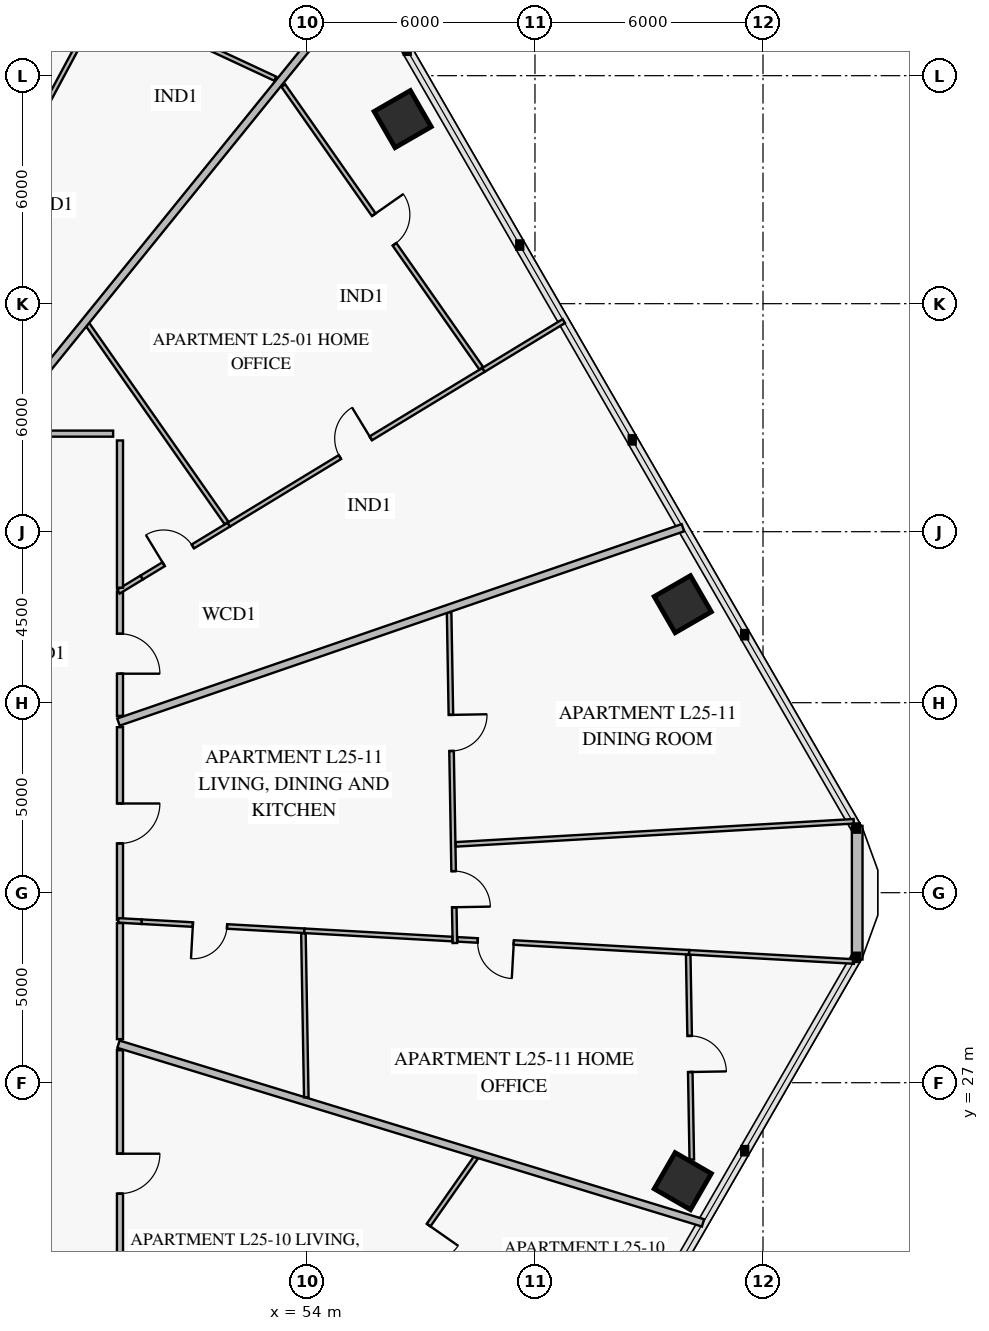
"""IFC4 building model, lengths in metres.
Left out: names, types, materials, properties, quantities, classifications, styles, units other than length and angle.
Written with IfcOpenShell. Run it as: python <this file> out.ifc"""

import sys

from ifc_helpers import new_model, si_unit, direction, frame, frame_2d, origin, origin_2d, place, context, subcontext, project, spatial, rectangle, extrude, element, fill, save


model = new_model("IFC4")
c1 = context("Model", 3, precision=1e-05, world=origin(), true_north=direction((0.0, 1.0)))
c2 = subcontext(c1, "Body", "Model", "MODEL_VIEW")
j1 = project(units=[si_unit("LENGTHUNIT", "METRE"), si_unit("PLANEANGLEUNIT", "RADIAN")], contexts=[c1])
p1 = place(None, origin())
s1 = spatial("IfcSite", under=j1, at=p1, CompositionType="ELEMENT")
p2 = place(p1, origin())
s2 = spatial("IfcBuilding", under=s1, at=p2, CompositionType="ELEMENT")
p3 = place(p2, frame((0.0, 0.0, 103.8)))
s3 = spatial("IfcBuildingStorey", under=s2, at=p3, CompositionType="ELEMENT", Elevation=103.8)
for number, where, z_axis, x_axis in (
    (1, (63.889, 39.592, 0.0), (0.0, 0.0, 1.0), (-0.5, 0.866, 0.0)),
    (2, (56.519, 52.357, 0.0), (0.0, 0.0, 1.0), (-0.5, 0.866, 0.0)),
    (3, (63.889, 24.408, 0.0), (0.0, 0.0, 1.0), (0.5, 0.866, 0.0)),
):
    element("IfcColumn", number, at=place(p3, frame(where, z_axis=z_axis, x_axis=x_axis)), inside=s3, PredefinedType="COLUMN", context=c2, shape_type="SweptSolid", body=[
        extrude(rectangle(XDim=1.1, YDim=1.1, at=origin_2d()), origin(), (0.0, 0.0, 1.0), 3.55),
    ])
p4 = place(p3, frame((68.479, 33.758, 0.0), z_axis=(0.0, 0.0, 1.0), x_axis=(0.0, -1.0, 0.0)))
e4 = element("IfcWall", 4, at=p4, inside=s3, PredefinedType="SOLIDWALL", context=c2, shape_type="SweptSolid", body=[
    extrude(rectangle(XDim=3.515, YDim=0.28, at=frame_2d((1.758, 0.0))), origin(), (0.0, 0.0, 1.0), 3.55),
])
p5 = place(p3, frame((49.65, 40.293, 0.0), z_axis=(0.0, 0.0, 1.0), x_axis=(0.854654905255, 0.519196487781, 0.0)))
e5 = element("IfcWall", 5, at=p5, inside=s3, PredefinedType="PARTITIONING", context=c2, shape_type="SweptSolid", body=[
    extrude(rectangle(XDim=2.684, YDim=0.12, at=frame_2d((1.342, 0.0))), origin(), (0.0, 0.0, 1.0), 3.55),
])
p6 = place(p5, frame((0.677, 0.0, 0.0)))
e6 = element("IfcOpeningElement", 6, at=p6, cuts=e5, PredefinedType="OPENING", context=c2, shape_type="SweptSolid", body=[
    extrude(rectangle(XDim=0.9, YDim=2.1, at=frame_2d((0.45, 1.05))), frame((0.0, 0.072, 0.0), z_axis=(0.0, -1.0, 0.0), x_axis=(1.0, 0.0, 0.0)), (0.0, 0.0, 1.0), 0.144),
])
p7 = place(p3, frame((51.944, 41.686, 0.0), z_axis=(0.0, 0.0, 1.0), x_axis=(0.854642479396, 0.519216941569, 0.0)))
e7 = element("IfcWall", 7, at=p7, inside=s3, PredefinedType="PARTITIONING", context=c2, shape_type="SweptSolid", body=[
    extrude(rectangle(XDim=7.843, YDim=0.12, at=frame_2d((3.921, 0.0))), origin(), (0.0, 0.0, 1.0), 3.1),
])
p8 = place(p7, frame((3.421, 0.0, 0.0)))
e8 = element("IfcOpeningElement", 8, at=p8, cuts=e7, PredefinedType="OPENING", context=c2, shape_type="SweptSolid", body=[
    extrude(rectangle(XDim=0.95, YDim=2.1, at=frame_2d((0.475, 1.05))), frame((0.0, 0.072, 0.0), z_axis=(0.0, -1.0, 0.0), x_axis=(1.0, 0.0, 0.0)), (0.0, 0.0, 1.0), 0.144),
])
p9 = place(p3, frame((58.586, 45.801, 0.0), z_axis=(0.0, 0.0, 1.0), x_axis=(-0.573574227098, 0.81915359122, 0.0)))
e9 = element("IfcWall", 9, at=p9, inside=s3, PredefinedType="PARTITIONING", context=c2, shape_type="SweptSolid", body=[
    extrude(rectangle(XDim=9.08, YDim=0.12, at=frame_2d((4.54, 0.0))), origin(), (0.0, 0.0, 1.0), 2.85),
])
p10 = place(p9, frame((3.98, 0.0, 0.0)))
e10 = element("IfcOpeningElement", 10, at=p10, cuts=e9, PredefinedType="OPENING", context=c2, shape_type="SweptSolid", body=[
    extrude(rectangle(XDim=0.95, YDim=2.1, at=frame_2d((0.475, 1.05))), frame((0.0, 0.072, 0.0), z_axis=(0.0, -1.0, 0.0), x_axis=(1.0, 0.0, 0.0)), (0.0, 0.0, 1.0), 0.144),
])
p11 = place(p3, frame((49.08, 36.653, 0.0), z_axis=(0.0, 0.0, 1.0), x_axis=(0.0, 1.0, 0.0)))
e11 = element("IfcWall", 11, at=p11, inside=s3, PredefinedType="PARTITIONING", context=c2, shape_type="SweptSolid", body=[
    extrude(rectangle(XDim=3.27, YDim=0.16, at=frame_2d((1.635, 0.0))), origin(), (0.0, 0.0, 1.0), 3.55),
])
p12 = place(p11, frame((1.11, 0.0, 0.0)))
e12 = element("IfcOpeningElement", 12, at=p12, cuts=e11, PredefinedType="OPENING", context=c2, shape_type="SweptSolid", body=[
    extrude(rectangle(XDim=1.05, YDim=2.15, at=frame_2d((0.525, 1.075))), frame((0.0, 0.092, 0.0), z_axis=(0.0, -1.0, 0.0), x_axis=(1.0, 0.0, 0.0)), (0.0, 0.0, 1.0), 0.184),
])
p13 = place(p3, frame((53.166, 53.42, 0.0), z_axis=(0.0, 0.0, 1.0), x_axis=(-0.906301834907, 0.422631025889, 0.0)))
e13 = element("IfcWall", 13, at=p13, inside=s3, PredefinedType="PARTITIONING", context=c2, shape_type="SweptSolid", body=[
    extrude(rectangle(XDim=5.096, YDim=0.12, at=frame_2d((2.548, 0.0))), origin(), (0.0, 0.0, 1.0), 3.55),
])
p14 = place(p13, frame((2.073, 0.0, 0.0)))
e14 = element("IfcOpeningElement", 14, at=p14, cuts=e13, PredefinedType="OPENING", context=c2, shape_type="SweptSolid", body=[
    extrude(rectangle(XDim=0.95, YDim=2.1, at=frame_2d((0.475, 1.05))), frame((0.0, 0.072, 0.0), z_axis=(0.0, -1.0, 0.0), x_axis=(1.0, 0.0, 0.0)), (0.0, 0.0, 1.0), 0.144),
])
p15 = place(p3, frame((44.038, 46.965, 0.0), z_axis=(0.0, 0.0, 1.0), x_axis=(0.473145171057, 0.880984476086, 0.0)))
e15 = element("IfcWall", 15, at=p15, inside=s3, PredefinedType="PARTITIONING", context=c2, shape_type="SweptSolid", body=[
    extrude(rectangle(XDim=9.656, YDim=0.12, at=frame_2d((4.828, 0.0))), origin(), (0.0, 0.0, 1.0), 3.1),
])
p16 = place(p15, frame((5.014, 0.0, 0.0)))
e16 = element("IfcOpeningElement", 16, at=p16, cuts=e15, PredefinedType="OPENING", context=c2, shape_type="SweptSolid", body=[
    extrude(rectangle(XDim=0.95, YDim=2.1, at=frame_2d((0.475, 1.05))), frame((0.0, 0.072, 0.0), z_axis=(0.0, -1.0, 0.0), x_axis=(1.0, 0.0, 0.0)), (0.0, 0.0, 1.0), 0.144),
])
p17 = place(p3, frame((53.335, 17.732, 0.0), z_axis=(0.0, 0.0, 1.0), x_axis=(0.573576398243, 0.819152070972, 0.0)))
e17 = element("IfcWall", 17, at=p17, inside=s3, PredefinedType="PARTITIONING", context=c2, shape_type="SweptSolid", body=[
    extrude(rectangle(XDim=8.907, YDim=0.12, at=frame_2d((4.453, 0.0))), origin(), (0.0, 0.0, 1.0), 3.55),
])
p18 = place(p17, frame((1.576, 0.0, 0.0)))
e18 = element("IfcOpeningElement", 18, at=p18, cuts=e17, PredefinedType="OPENING", context=c2, shape_type="SweptSolid", body=[
    extrude(rectangle(XDim=0.95, YDim=2.1, at=frame_2d((0.475, 1.05))), frame((0.0, 0.072, 0.0), z_axis=(0.0, -1.0, 0.0), x_axis=(1.0, 0.0, 0.0)), (0.0, 0.0, 1.0), 0.144),
])
p19 = place(p17, frame((5.789, 0.0, 0.0)))
e19 = element("IfcOpeningElement", 19, at=p19, cuts=e17, PredefinedType="OPENING", context=c2, shape_type="SweptSolid", body=[
    extrude(rectangle(XDim=0.95, YDim=2.1, at=frame_2d((0.475, 1.05))), frame((0.0, 0.072, 0.0), z_axis=(0.0, -1.0, 0.0), x_axis=(1.0, 0.0, 0.0)), (0.0, 0.0, 1.0), 0.144),
])
p20 = place(p3, frame((49.08, 21.358, 0.0), z_axis=(0.0, 0.0, 1.0), x_axis=(0.0, 1.0, 0.0)))
e20 = element("IfcWall", 20, at=p20, inside=s3, PredefinedType="PARTITIONING", context=c2, shape_type="SweptSolid", body=[
    extrude(rectangle(XDim=6.497, YDim=0.16, at=frame_2d((3.249, 0.0))), origin(), (0.0, 0.0, 1.0), 3.55),
])
p21 = place(p20, frame((2.723, 0.0, 0.0)))
e21 = element("IfcOpeningElement", 21, at=p21, cuts=e20, PredefinedType="OPENING", context=c2, shape_type="SweptSolid", body=[
    extrude(rectangle(XDim=1.05, YDim=2.15, at=frame_2d((0.525, 1.075))), frame((0.0, 0.092, 0.0), z_axis=(0.0, -1.0, 0.0), x_axis=(1.0, 0.0, 0.0)), (0.0, 0.0, 1.0), 0.184),
])
p22 = place(p3, frame((57.893, 30.676, 0.0), z_axis=(0.0, 0.0, 1.0), x_axis=(-0.017472298046, 0.999847347749, 0.0)))
e22 = element("IfcWall", 22, at=p22, inside=s3, PredefinedType="PARTITIONING", context=c2, shape_type="SweptSolid", body=[
    extrude(rectangle(XDim=8.705, YDim=0.12, at=frame_2d((4.353, 0.0))), origin(), (0.0, 0.0, 1.0), 2.85),
])
p23 = place(p22, frame((0.941, 0.0, 0.0)))
e23 = element("IfcOpeningElement", 23, at=p23, cuts=e22, PredefinedType="OPENING", context=c2, shape_type="SweptSolid", body=[
    extrude(rectangle(XDim=0.95, YDim=2.1, at=frame_2d((0.475, 1.05))), frame((0.0, 0.072, 0.0), z_axis=(0.0, -1.0, 0.0), x_axis=(1.0, 0.0, 0.0)), (0.0, 0.0, 1.0), 0.144),
])
p24 = place(p22, frame((5.054, 0.0, 0.0)))
e24 = element("IfcOpeningElement", 24, at=p24, cuts=e22, PredefinedType="OPENING", context=c2, shape_type="SweptSolid", body=[
    extrude(rectangle(XDim=0.95, YDim=2.1, at=frame_2d((0.475, 1.05))), frame((0.0, 0.072, 0.0), z_axis=(0.0, -1.0, 0.0), x_axis=(1.0, 0.0, 0.0)), (0.0, 0.0, 1.0), 0.144),
])
p25 = place(p3, frame((49.65, 31.237, 0.0), z_axis=(0.0, 0.0, 1.0), x_axis=(0.998441902316, -0.055801144241, 0.0)))
e25 = element("IfcWall", 25, at=p25, inside=s3, PredefinedType="PARTITIONING", context=c2, shape_type="SweptSolid", body=[
    extrude(rectangle(XDim=4.288, YDim=0.12, at=frame_2d((2.144, 0.0))), origin(), (0.0, 0.0, 1.0), 3.55),
])
p26 = place(p25, frame((1.351, 0.0, 0.0)))
e26 = element("IfcOpeningElement", 26, at=p26, cuts=e25, PredefinedType="OPENING", context=c2, shape_type="SweptSolid", body=[
    extrude(rectangle(XDim=0.9, YDim=2.1, at=frame_2d((0.45, 1.05))), frame((0.0, 0.072, 0.0), z_axis=(0.0, -1.0, 0.0), x_axis=(1.0, 0.0, 0.0)), (0.0, 0.0, 1.0), 0.144),
])
p27 = place(p3, frame((53.931, 30.998, 0.0), z_axis=(0.0, 0.0, 1.0), x_axis=(0.998438110944, -0.055868941407, 0.0)))
e27 = element("IfcWall", 27, at=p27, inside=s3, PredefinedType="PARTITIONING", context=c2, shape_type="SweptSolid", body=[
    extrude(rectangle(XDim=3.898, YDim=0.12, at=frame_2d((1.949, 0.0))), origin(), (0.0, 0.0, 1.0), 3.1),
])
p28 = place(p3, frame((57.959, 30.772, 0.0), z_axis=(0.0, 0.0, 1.0), x_axis=(0.998441350972, -0.055811008487, 0.0)))
e28 = element("IfcWall", 28, at=p28, inside=s3, PredefinedType="PARTITIONING", context=c2, shape_type="SweptSolid", body=[
    extrude(rectangle(XDim=6.107, YDim=0.12, at=frame_2d((3.053, 0.0))), origin(), (0.0, 0.0, 1.0), 2.8),
])
p29 = place(p28, frame((0.536, 0.0, 0.0)))
e29 = element("IfcOpeningElement", 29, at=p29, cuts=e28, PredefinedType="OPENING", context=c2, shape_type="SweptSolid", body=[
    extrude(rectangle(XDim=0.95, YDim=2.1, at=frame_2d((0.475, 1.05))), frame((0.0, 0.072, 0.0), z_axis=(0.0, -1.0, 0.0), x_axis=(1.0, 0.0, 0.0)), (0.0, 0.0, 1.0), 0.144),
])
p30 = place(p3, frame((64.126, 24.979, 0.0), z_axis=(0.0, 0.0, 1.0), x_axis=(-0.017448954527, 0.999847755404, 0.0)))
e30 = element("IfcWall", 30, at=p30, inside=s3, PredefinedType="PARTITIONING", context=c2, shape_type="SweptSolid", body=[
    extrude(rectangle(XDim=5.387, YDim=0.12, at=frame_2d((2.693, 0.0))), origin(), (0.0, 0.0, 1.0), 2.8),
])
p31 = place(p30, frame((2.303, 0.0, 0.0)))
e31 = element("IfcOpeningElement", 31, at=p31, cuts=e30, PredefinedType="OPENING", context=c2, shape_type="SweptSolid", body=[
    extrude(rectangle(XDim=0.95, YDim=2.1, at=frame_2d((0.475, 1.05))), frame((0.0, 0.072, 0.0), z_axis=(0.0, -1.0, 0.0), x_axis=(1.0, 0.0, 0.0)), (0.0, 0.0, 1.0), 0.144),
])
p32 = place(p3, frame((49.08, 31.289, 0.0), z_axis=(0.0, 0.0, 1.0), x_axis=(0.0, 1.0, 0.0)))
e32 = element("IfcWall", 32, at=p32, inside=s3, PredefinedType="PARTITIONING", context=c2, shape_type="SweptSolid", body=[
    extrude(rectangle(XDim=5.067, YDim=0.16, at=frame_2d((2.533, 0.0))), origin(), (0.0, 0.0, 1.0), 2.85),
])
p33 = place(p32, frame((2.008, 0.0, 0.0)))
e33 = element("IfcOpeningElement", 33, at=p33, cuts=e32, PredefinedType="OPENING", context=c2, shape_type="SweptSolid", body=[
    extrude(rectangle(XDim=1.05, YDim=2.15, at=frame_2d((0.525, 1.075))), frame((0.0, 0.092, 0.0), z_axis=(0.0, -1.0, 0.0), x_axis=(1.0, 0.0, 0.0)), (0.0, 0.0, 1.0), 0.184),
])
p34 = place(p3, frame((49.04, 36.49, 0.0), z_axis=(0.0, 0.0, 1.0), x_axis=(0.945516411569, 0.325574439191, 0.0)))
e34 = element("IfcWall", 34, at=p34, inside=s3, PredefinedType="PARTITIONING", context=c2, shape_type="SweptSolid", body=[
    extrude(rectangle(XDim=15.709, YDim=0.2, at=frame_2d((7.854, 0.0))), origin(), (0.0, 0.0, 1.0), 2.8),
])
p35 = place(p3, frame((49.042, 39.923, 0.0), z_axis=(0.0, 0.0, 1.0), x_axis=(0.854635339674, 0.519228693526, 0.0)))
e35 = element("IfcWall", 35, at=p35, inside=s3, PredefinedType="PARTITIONING", context=c2, shape_type="SweptSolid", body=[
    extrude(rectangle(XDim=0.712, YDim=0.12, at=frame_2d((0.356, 0.0))), origin(), (0.0, 0.0, 1.0), 3.55),
])
p36 = place(p3, frame((58.646, 45.758, 0.0), z_axis=(0.0, 0.0, 1.0), x_axis=(0.854604427489, 0.519279570672, 0.0)))
e36 = element("IfcWall", 36, at=p36, inside=s3, PredefinedType="PARTITIONING", context=c2, shape_type="SweptSolid", body=[
    extrude(rectangle(XDim=2.472, YDim=0.12, at=frame_2d((1.236, 0.0))), origin(), (0.0, 0.0, 1.0), 2.8),
])
p37 = place(p3, frame((51.884, 41.729, 0.0), z_axis=(0.0, 0.0, 1.0), x_axis=(-0.573595462393, 0.819138721782, 0.0)))
e37 = element("IfcWall", 37, at=p37, inside=s3, PredefinedType="PARTITIONING", context=c2, shape_type="SweptSolid", body=[
    extrude(rectangle(XDim=6.4, YDim=0.12, at=frame_2d((3.2, 0.0))), origin(), (0.0, 0.0, 1.0), 2.85),
])
p38 = place(p3, frame((45.75, 44.04, 0.0), z_axis=(0.0, 0.0, 1.0), x_axis=(0.629320806321, 0.777145625177, 0.0)))
e38 = element("IfcWall", 38, at=p38, inside=s3, PredefinedType="PARTITIONING", context=c2, shape_type="SweptSolid", body=[
    extrude(rectangle(XDim=15.526, YDim=0.2, at=frame_2d((7.763, 0.0))), origin(), (0.0, 0.0, 1.0), 2.8),
])
p39 = place(p3, frame((49.04, 28.013, 0.0), z_axis=(0.0, 0.0, 1.0), x_axis=(0.956308788135, -0.292358515757, 0.0)))
e39 = element("IfcWall", 39, at=p39, inside=s3, PredefinedType="PARTITIONING", context=c2, shape_type="SweptSolid", body=[
    extrude(rectangle(XDim=16.084, YDim=0.2, at=frame_2d((8.042, 0.0))), origin(), (0.0, 0.0, 1.0), 2.8),
])
p40 = place(p3, frame((57.915, 33.271, 0.0), z_axis=(0.0, 0.0, 1.0), x_axis=(0.998320843176, 0.057926626694, 0.0)))
e40 = element("IfcWall", 40, at=p40, inside=s3, PredefinedType="PARTITIONING", context=c2, shape_type="SweptSolid", body=[
    extrude(rectangle(XDim=10.49, YDim=0.12, at=frame_2d((5.245, 0.0))), origin(), (0.0, 0.0, 1.0), 2.8),
])
p41 = place(p3, frame((49.035, 31.271, 0.0), z_axis=(0.0, 0.0, 1.0), x_axis=(0.998437094127, -0.055887110072, 0.0)))
e41 = element("IfcWall", 41, at=p41, inside=s3, PredefinedType="PARTITIONING", context=c2, shape_type="SweptSolid", body=[
    extrude(rectangle(XDim=0.616, YDim=0.12, at=frame_2d((0.308, 0.0))), origin(), (0.0, 0.0, 1.0), 3.55),
])
p42 = place(p3, frame((64.056, 30.431, 0.0), z_axis=(0.0, 0.0, 1.0), x_axis=(0.998439890164, -0.05583713575, 0.0)))
e42 = element("IfcWall", 42, at=p42, inside=s3, PredefinedType="PARTITIONING", context=c2, shape_type="SweptSolid", body=[
    extrude(rectangle(XDim=4.346, YDim=0.12, at=frame_2d((2.173, 0.0))), origin(), (0.0, 0.0, 1.0), 3.55),
])
p43 = place(p3, frame((53.982, 26.615, 0.0), z_axis=(0.0, 0.0, 1.0), x_axis=(-0.017478660109, 0.999847236552, 0.0)))
e43 = element("IfcWall", 43, at=p43, inside=s3, PredefinedType="PARTITIONING", context=c2, shape_type="SweptSolid", body=[
    extrude(rectangle(XDim=4.316, YDim=0.12, at=frame_2d((2.158, 0.0))), origin(), (0.0, 0.0, 1.0), 2.85),
])
p44 = place(p3, frame((49.08, 40.026, 0.0), z_axis=(0.0, 0.0, 1.0), x_axis=(0.0, 1.0, 0.0)))
e44 = element("IfcWall", 44, at=p44, inside=s3, PredefinedType="PARTITIONING", context=c2, shape_type="SweptSolid", body=[
    extrude(rectangle(XDim=3.874, YDim=0.16, at=frame_2d((1.937, 0.0))), origin(), (0.0, 0.0, 1.0), 3.55),
])
p45 = place(p3, frame((48.9, 44.08, 0.0), z_axis=(0.0, 0.0, 1.0), x_axis=(-1.0, 0.0, 0.0)))
e45 = element("IfcWall", 45, at=p45, inside=s3, PredefinedType="PARTITIONING", context=c2, shape_type="SweptSolid", body=[
    extrude(rectangle(XDim=2.916, YDim=0.16, at=frame_2d((1.458, 0.0))), origin(), (0.0, 0.0, 1.0), 2.85),
])
p46 = place(p3, frame((49.08, 28.146, 0.0), z_axis=(0.0, 0.0, 1.0), x_axis=(0.0, 1.0, 0.0)))
e46 = element("IfcWall", 46, at=p46, inside=s3, PredefinedType="PARTITIONING", context=c2, shape_type="SweptSolid", body=[
    extrude(rectangle(XDim=3.054, YDim=0.16, at=frame_2d((1.527, 0.0))), origin(), (0.0, 0.0, 1.0), 2.85),
])
p47 = place(p6, origin())
e47 = element("IfcDoor", 47, at=p47, inside=s3, OperationType="SINGLE_SWING_LEFT", PredefinedType="DOOR", context=c2, shape_type="SweptSolid", body=[
    extrude(rectangle(XDim=0.9, YDim=2.1, at=frame_2d((0.45, 1.05))), frame((0.0, 0.025, 0.0), z_axis=(0.0, -1.0, 0.0), x_axis=(1.0, 0.0, 0.0)), (0.0, 0.0, 1.0), 0.05),
])
fill(e6, e47)
p48 = place(p8, origin())
e48 = element("IfcDoor", 48, at=p48, inside=s3, OperationType="SINGLE_SWING_RIGHT", PredefinedType="DOOR", context=c2, shape_type="SweptSolid", body=[
    extrude(rectangle(XDim=0.95, YDim=2.1, at=frame_2d((0.475, 1.05))), frame((0.0, 0.025, 0.0), z_axis=(0.0, -1.0, 0.0), x_axis=(1.0, 0.0, 0.0)), (0.0, 0.0, 1.0), 0.05),
])
fill(e8, e48)
p49 = place(p10, frame((0.95, 0.0, 0.0), z_axis=(0.0, 0.0, 1.0), x_axis=(-1.0, 0.0, 0.0)))
e49 = element("IfcDoor", 49, at=p49, inside=s3, OperationType="SINGLE_SWING_LEFT", PredefinedType="DOOR", context=c2, shape_type="SweptSolid", body=[
    extrude(rectangle(XDim=0.95, YDim=2.1, at=frame_2d((0.475, 1.05))), frame((0.0, 0.025, 0.0), z_axis=(0.0, -1.0, 0.0), x_axis=(1.0, 0.0, 0.0)), (0.0, 0.0, 1.0), 0.05),
])
fill(e10, e49)
p50 = place(p12, frame((1.05, 0.0, 0.0), z_axis=(0.0, 0.0, 1.0), x_axis=(-1.0, 0.0, 0.0)))
e50 = element("IfcDoor", 50, at=p50, inside=s3, OperationType="SINGLE_SWING_RIGHT", PredefinedType="DOOR", context=c2, shape_type="SweptSolid", body=[
    extrude(rectangle(XDim=1.05, YDim=2.15, at=frame_2d((0.525, 1.075))), frame((0.0, 0.025, 0.0), z_axis=(0.0, -1.0, 0.0), x_axis=(1.0, 0.0, 0.0)), (0.0, 0.0, 1.0), 0.05),
])
fill(e12, e50)
p51 = place(p19, frame((0.95, 0.0, 0.0), z_axis=(0.0, 0.0, 1.0), x_axis=(-1.0, 0.0, 0.0)))
e51 = element("IfcDoor", 51, at=p51, inside=s3, OperationType="SINGLE_SWING_LEFT", PredefinedType="DOOR", context=c2, shape_type="SweptSolid", body=[
    extrude(rectangle(XDim=0.95, YDim=2.1, at=frame_2d((0.475, 1.05))), frame((0.0, 0.025, 0.0), z_axis=(0.0, -1.0, 0.0), x_axis=(1.0, 0.0, 0.0)), (0.0, 0.0, 1.0), 0.05),
])
fill(e19, e51)
p52 = place(p21, frame((1.05, 0.0, 0.0), z_axis=(0.0, 0.0, 1.0), x_axis=(-1.0, 0.0, 0.0)))
e52 = element("IfcDoor", 52, at=p52, inside=s3, OperationType="SINGLE_SWING_LEFT", PredefinedType="DOOR", context=c2, shape_type="SweptSolid", body=[
    extrude(rectangle(XDim=1.05, YDim=2.15, at=frame_2d((0.525, 1.075))), frame((0.0, 0.025, 0.0), z_axis=(0.0, -1.0, 0.0), x_axis=(1.0, 0.0, 0.0)), (0.0, 0.0, 1.0), 0.05),
])
fill(e21, e52)
p53 = place(p23, frame((0.95, 0.0, 0.0), z_axis=(0.0, 0.0, 1.0), x_axis=(-1.0, 0.0, 0.0)))
e53 = element("IfcDoor", 53, at=p53, inside=s3, OperationType="SINGLE_SWING_RIGHT", PredefinedType="DOOR", context=c2, shape_type="SweptSolid", body=[
    extrude(rectangle(XDim=0.95, YDim=2.1, at=frame_2d((0.475, 1.05))), frame((0.0, 0.025, 0.0), z_axis=(0.0, -1.0, 0.0), x_axis=(1.0, 0.0, 0.0)), (0.0, 0.0, 1.0), 0.05),
])
fill(e23, e53)
p54 = place(p24, frame((0.95, 0.0, 0.0), z_axis=(0.0, 0.0, 1.0), x_axis=(-1.0, 0.0, 0.0)))
e54 = element("IfcDoor", 54, at=p54, inside=s3, OperationType="SINGLE_SWING_LEFT", PredefinedType="DOOR", context=c2, shape_type="SweptSolid", body=[
    extrude(rectangle(XDim=0.95, YDim=2.1, at=frame_2d((0.475, 1.05))), frame((0.0, 0.025, 0.0), z_axis=(0.0, -1.0, 0.0), x_axis=(1.0, 0.0, 0.0)), (0.0, 0.0, 1.0), 0.05),
])
fill(e24, e54)
p55 = place(p26, frame((0.9, 0.0, 0.0), z_axis=(0.0, 0.0, 1.0), x_axis=(-1.0, 0.0, 0.0)))
e55 = element("IfcDoor", 55, at=p55, inside=s3, OperationType="SINGLE_SWING_RIGHT", PredefinedType="DOOR", context=c2, shape_type="SweptSolid", body=[
    extrude(rectangle(XDim=0.9, YDim=2.1, at=frame_2d((0.45, 1.05))), frame((0.0, 0.025, 0.0), z_axis=(0.0, -1.0, 0.0), x_axis=(1.0, 0.0, 0.0)), (0.0, 0.0, 1.0), 0.05),
])
fill(e26, e55)
p56 = place(p29, frame((0.95, 0.0, 0.0), z_axis=(0.0, 0.0, 1.0), x_axis=(-1.0, 0.0, 0.0)))
e56 = element("IfcDoor", 56, at=p56, inside=s3, OperationType="SINGLE_SWING_LEFT", PredefinedType="DOOR", context=c2, shape_type="SweptSolid", body=[
    extrude(rectangle(XDim=0.95, YDim=2.1, at=frame_2d((0.475, 1.05))), frame((0.0, 0.025, 0.0), z_axis=(0.0, -1.0, 0.0), x_axis=(1.0, 0.0, 0.0)), (0.0, 0.0, 1.0), 0.05),
])
fill(e29, e56)
p57 = place(p31, frame((0.95, 0.0, 0.0), z_axis=(0.0, 0.0, 1.0), x_axis=(-1.0, 0.0, 0.0)))
e57 = element("IfcDoor", 57, at=p57, inside=s3, OperationType="SINGLE_SWING_RIGHT", PredefinedType="DOOR", context=c2, shape_type="SweptSolid", body=[
    extrude(rectangle(XDim=0.95, YDim=2.1, at=frame_2d((0.475, 1.05))), frame((0.0, 0.025, 0.0), z_axis=(0.0, -1.0, 0.0), x_axis=(1.0, 0.0, 0.0)), (0.0, 0.0, 1.0), 0.05),
])
fill(e31, e57)
p58 = place(p33, frame((1.05, 0.0, 0.0), z_axis=(0.0, 0.0, 1.0), x_axis=(-1.0, 0.0, 0.0)))
e58 = element("IfcDoor", 58, at=p58, inside=s3, OperationType="SINGLE_SWING_LEFT", PredefinedType="DOOR", context=c2, shape_type="SweptSolid", body=[
    extrude(rectangle(XDim=1.05, YDim=2.15, at=frame_2d((0.525, 1.075))), frame((0.0, 0.025, 0.0), z_axis=(0.0, -1.0, 0.0), x_axis=(1.0, 0.0, 0.0)), (0.0, 0.0, 1.0), 0.05),
])
fill(e33, e58)
save(model, sys.argv[1])
